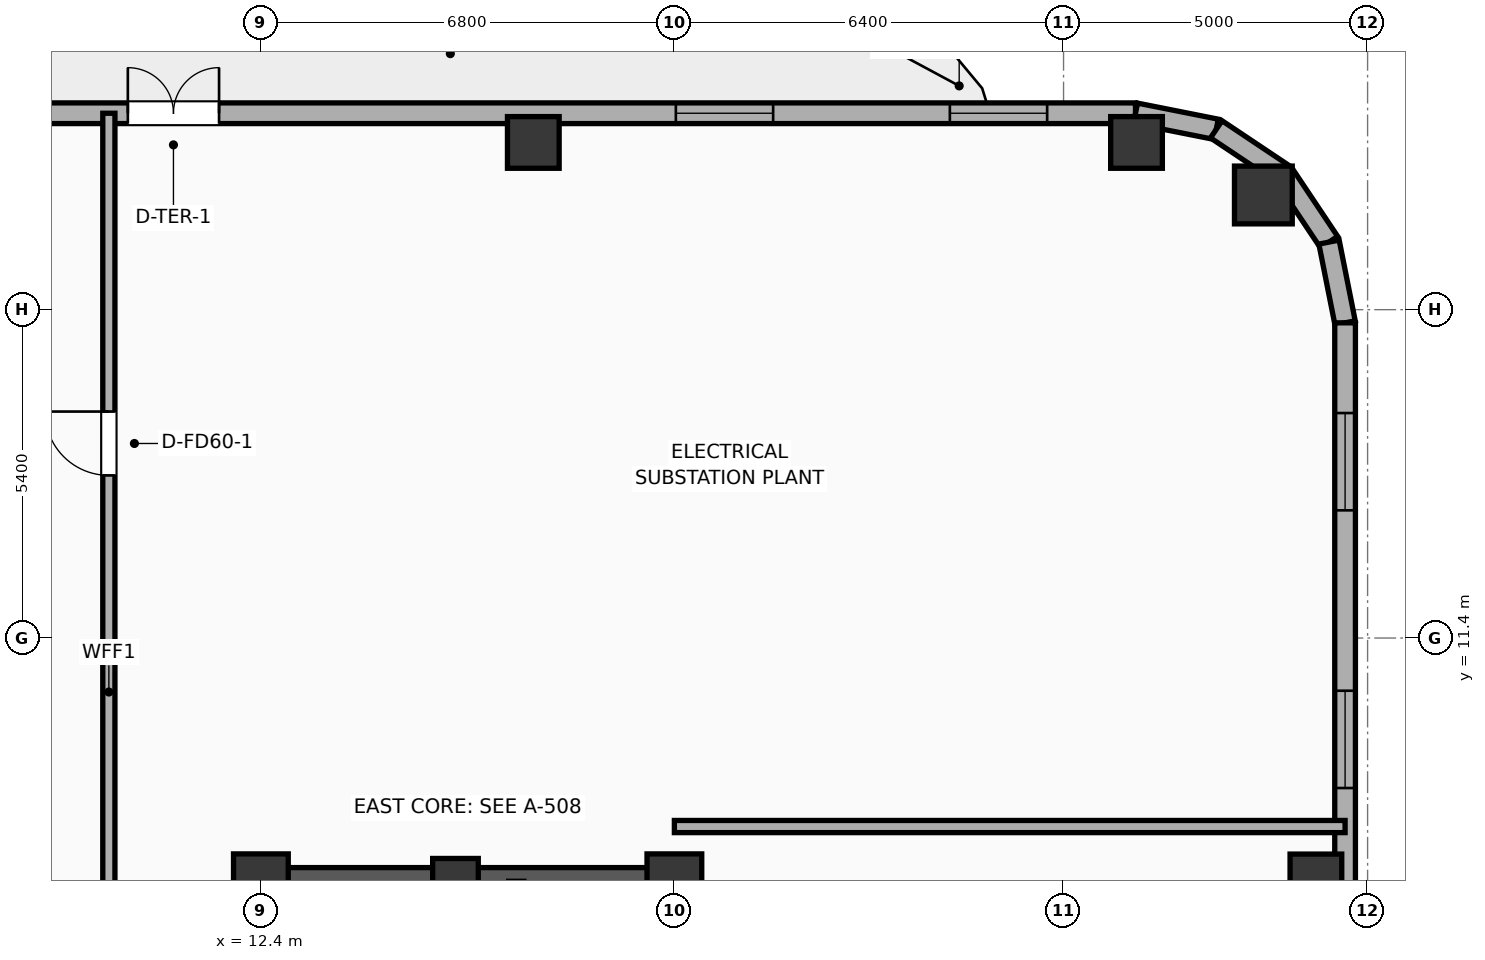
"""IFC4 building model, lengths in metres.
Left out: names, types, materials, properties, quantities, classifications, styles, units other than length and angle.
Written with IfcOpenShell. Run it as: python <this file> out.ifc"""

import sys

from ifc_helpers import new_model, si_unit, direction, frame, frame_2d, origin, origin_2d, place, context, subcontext, project, spatial, rectangle, hollow_rectangle, hollow_circle, extrude, element, fill, save


model = new_model("IFC4")
c1 = context("Model", 3, precision=1e-05, world=origin(), true_north=direction((0.0, 1.0)))
c2 = subcontext(c1, "Body", "Model", "MODEL_VIEW")
j1 = project(units=[si_unit("LENGTHUNIT", "METRE"), si_unit("PLANEANGLEUNIT", "RADIAN")], contexts=[c1])
p1 = place(None, origin())
s1 = spatial("IfcSite", under=j1, at=p1, CompositionType="ELEMENT")
p2 = place(p1, origin())
s2 = spatial("IfcBuilding", under=s1, at=p2, CompositionType="ELEMENT")
p3 = place(p2, frame((0.0, 0.0, 195.0)))
s3 = spatial("IfcBuildingStorey", under=s2, at=p3, CompositionType="ELEMENT", Elevation=195.0)
p4 = place(p3, frame((12.4, 7.4, 0.0), z_axis=(0.0, 0.0, 1.0), x_axis=(1.0, 0.0, 0.0)))
e1 = element("IfcColumn", 1, at=p4, inside=s3, PredefinedType="COLUMN", context=c2, shape_type="SweptSolid", body=[
    extrude(rectangle(XDim=0.9, YDim=0.9, at=origin_2d()), origin(), (0.0, 0.0, 1.0), 5.2),
])
p5 = place(p3, frame((15.6, 7.4, 0.0), z_axis=(0.0, 0.0, 1.0), x_axis=(1.0, 0.0, 0.0)))
e2 = element("IfcColumn", 2, at=p5, inside=s3, PredefinedType="COLUMN", context=c2, shape_type="SweptSolid", body=[
    extrude(rectangle(XDim=0.75, YDim=0.75, at=origin_2d()), origin(), (0.0, 0.0, 1.0), 5.2),
])
p6 = place(p3, frame((19.2, 7.4, 0.0), z_axis=(0.0, 0.0, 1.0), x_axis=(1.0, 0.0, 0.0)))
e3 = element("IfcColumn", 3, at=p6, inside=s3, PredefinedType="COLUMN", context=c2, shape_type="SweptSolid", body=[
    extrude(rectangle(XDim=0.9, YDim=0.9, at=origin_2d()), origin(), (0.0, 0.0, 1.0), 5.2),
])
p7 = place(p3, frame((12.175, 7.4, 0.0), z_axis=(0.0, 0.0, 1.0), x_axis=(1.0, 0.0, 0.0)))
e4 = element("IfcWall", 4, at=p7, inside=s3, PredefinedType="SHEAR", context=c2, shape_type="SweptSolid", body=[
    extrude(rectangle(XDim=7.25, YDim=0.45, at=frame_2d((3.625, 0.0))), origin(), (0.0, 0.0, 1.0), 4.8),
])
p8 = place(p3, frame((29.75, 7.422, -0.4), z_axis=(0.0, 0.0, 1.0), x_axis=(1.0, 0.0, 0.0)))
e5 = element("IfcColumn", 5, at=p8, inside=s3, PredefinedType="COLUMN", context=c2, shape_type="SweptSolid", body=[
    extrude(hollow_rectangle(XDim=0.85, YDim=0.85, WallThickness=0.028, at=origin_2d()), origin(), (0.0, 0.0, 1.0), 5.6),
])
p9 = place(p3, frame((28.886, 18.686, -0.4), z_axis=(0.0, 0.0, 1.0), x_axis=(1.0, 0.0, 0.0)))
e6 = element("IfcColumn", 6, at=p9, inside=s3, PredefinedType="COLUMN", context=c2, shape_type="SweptSolid", body=[
    extrude(hollow_circle(Radius=0.475, WallThickness=0.032, at=origin_2d()), origin(), (0.0, 0.0, 1.0), 5.6),
])
for number, where, z_axis, x_axis in (
    (7, (26.8, 19.55, -0.4), (0.0, 0.0, 1.0), (1.0, 0.0, 0.0)),
    (8, (16.88, 19.55, -0.4), (0.0, 0.0, 1.0), (1.0, 0.0, 0.0)),
):
    element("IfcColumn", number, at=place(p3, frame(where, z_axis=z_axis, x_axis=x_axis)), inside=s3, PredefinedType="COLUMN", context=c2, shape_type="SweptSolid", body=[
        extrude(hollow_rectangle(XDim=0.85, YDim=0.85, WallThickness=0.028, at=origin_2d()), origin(), (0.0, 0.0, 1.0), 5.6),
    ])
p10 = place(p3, frame((-22.783, 20.03, 0.0), z_axis=(0.0, 0.0, 1.0), x_axis=(1.0, 0.0, 0.0)))
e9 = element("IfcWall", 9, at=p10, inside=s3, PredefinedType="ELEMENTEDWALL", context=c2, shape_type="SweptSolid", body=[
    extrude(rectangle(XDim=49.566, YDim=0.34, at=frame_2d((24.783, 0.0))), origin(), (0.0, 0.0, 1.0), 3.69),
])
p11 = place(p10, frame((1.453, 0.0, 0.75)))
e10 = element("IfcOpeningElement", 10, at=p11, cuts=e9, PredefinedType="OPENING", context=c2, shape_type="SweptSolid", body=[
    extrude(rectangle(XDim=1.6, YDim=1.4, at=frame_2d((0.8, 0.7))), frame((0.0, 0.18, 0.0), z_axis=(0.0, -1.0, 0.0), x_axis=(1.0, 0.0, 0.0)), (0.0, 0.0, 1.0), 0.36),
])
p12 = place(p10, frame((5.959, 0.0, 0.75)))
e11 = element("IfcOpeningElement", 11, at=p12, cuts=e9, PredefinedType="OPENING", context=c2, shape_type="SweptSolid", body=[
    extrude(rectangle(XDim=1.6, YDim=1.4, at=frame_2d((0.8, 0.7))), frame((0.0, 0.18, 0.0), z_axis=(0.0, -1.0, 0.0), x_axis=(1.0, 0.0, 0.0)), (0.0, 0.0, 1.0), 0.36),
])
p13 = place(p10, frame((14.971, 0.0, 0.75)))
e12 = element("IfcOpeningElement", 12, at=p13, cuts=e9, PredefinedType="OPENING", context=c2, shape_type="SweptSolid", body=[
    extrude(rectangle(XDim=1.6, YDim=1.4, at=frame_2d((0.8, 0.7))), frame((0.0, 0.18, 0.0), z_axis=(0.0, -1.0, 0.0), x_axis=(1.0, 0.0, 0.0)), (0.0, 0.0, 1.0), 0.36),
])
p14 = place(p10, frame((23.983, 0.0, 0.75)))
e13 = element("IfcOpeningElement", 13, at=p14, cuts=e9, PredefinedType="OPENING", context=c2, shape_type="SweptSolid", body=[
    extrude(rectangle(XDim=1.6, YDim=1.4, at=frame_2d((0.8, 0.7))), frame((0.0, 0.18, 0.0), z_axis=(0.0, -1.0, 0.0), x_axis=(1.0, 0.0, 0.0)), (0.0, 0.0, 1.0), 0.36),
])
p15 = place(p10, frame((32.995, 0.0, 0.0)))
e14 = element("IfcOpeningElement", 14, at=p15, cuts=e9, PredefinedType="OPENING", context=c2, shape_type="SweptSolid", body=[
    extrude(rectangle(XDim=1.5, YDim=2.05, at=frame_2d((0.75, 1.025))), frame((0.0, 0.18, 0.0), z_axis=(0.0, -1.0, 0.0), x_axis=(1.0, 0.0, 0.0)), (0.0, 0.0, 1.0), 0.36),
])
p16 = place(p10, frame((42.008, 0.0, 0.75)))
e15 = element("IfcOpeningElement", 15, at=p16, cuts=e9, PredefinedType="OPENING", context=c2, shape_type="SweptSolid", body=[
    extrude(rectangle(XDim=1.6, YDim=1.4, at=frame_2d((0.8, 0.7))), frame((0.0, 0.18, 0.0), z_axis=(0.0, -1.0, 0.0), x_axis=(1.0, 0.0, 0.0)), (0.0, 0.0, 1.0), 0.36),
])
p17 = place(p10, frame((46.514, 0.0, 0.75)))
e16 = element("IfcOpeningElement", 16, at=p17, cuts=e9, PredefinedType="OPENING", context=c2, shape_type="SweptSolid", body=[
    extrude(rectangle(XDim=1.6, YDim=1.4, at=frame_2d((0.8, 0.7))), frame((0.0, 0.18, 0.0), z_axis=(0.0, -1.0, 0.0), x_axis=(1.0, 0.0, 0.0)), (0.0, 0.0, 1.0), 0.36),
])
p18 = place(p3, frame((26.783, 20.03, 0.0), z_axis=(0.0, 0.0, 1.0), x_axis=(0.980788153188, -0.195075878998, 0.0)))
e17 = element("IfcWall", 17, at=p18, inside=s3, PredefinedType="ELEMENTEDWALL", context=c2, shape_type="SweptSolid", body=[
    extrude(rectangle(XDim=1.354, YDim=0.34, at=frame_2d((0.677, 0.0))), origin(), (0.0, 0.0, 1.0), 3.69),
])
p19 = place(p3, frame((28.111, 19.766, 0.0), z_axis=(0.0, 0.0, 1.0), x_axis=(0.831403586725, -0.555669034571, 0.0)))
e18 = element("IfcWall", 18, at=p19, inside=s3, PredefinedType="ELEMENTEDWALL", context=c2, shape_type="SweptSolid", body=[
    extrude(rectangle(XDim=1.337, YDim=0.34, at=frame_2d((0.668, 0.0))), origin(), (0.0, 0.0, 1.0), 3.69),
])
p20 = place(p3, frame((29.223, 19.023, 0.0), z_axis=(0.0, 0.0, 1.0), x_axis=(0.555669034571, -0.831403586725, 0.0)))
e19 = element("IfcWall", 19, at=p20, inside=s3, PredefinedType="ELEMENTEDWALL", context=c2, shape_type="SweptSolid", body=[
    extrude(rectangle(XDim=1.337, YDim=0.34, at=frame_2d((0.668, 0.0))), origin(), (0.0, 0.0, 1.0), 4.8),
])
p21 = place(p3, frame((29.966, 17.911, 0.0), z_axis=(0.0, 0.0, 1.0), x_axis=(0.195075878998, -0.980788153188, 0.0)))
e20 = element("IfcWall", 20, at=p21, inside=s3, PredefinedType="ELEMENTEDWALL", context=c2, shape_type="SweptSolid", body=[
    extrude(rectangle(XDim=1.354, YDim=0.34, at=frame_2d((0.677, 0.0))), origin(), (0.0, 0.0, 1.0), 4.8),
])
p22 = place(p3, frame((30.23, 16.583, 0.0), z_axis=(0.0, 0.0, 1.0), x_axis=(0.0, -1.0, 0.0)))
e21 = element("IfcWall", 21, at=p22, inside=s3, PredefinedType="ELEMENTEDWALL", context=c2, shape_type="SweptSolid", body=[
    extrude(rectangle(XDim=31.967, YDim=0.34, at=frame_2d((15.983, 0.0))), origin(), (0.0, 0.0, 1.0), 3.69),
])
p23 = place(p22, frame((1.483, 0.0, 0.75)))
e22 = element("IfcOpeningElement", 22, at=p23, cuts=e21, PredefinedType="OPENING", context=c2, shape_type="SweptSolid", body=[
    extrude(rectangle(XDim=1.6, YDim=1.4, at=frame_2d((0.8, 0.7))), frame((0.0, 0.18, 0.0), z_axis=(0.0, -1.0, 0.0), x_axis=(1.0, 0.0, 0.0)), (0.0, 0.0, 1.0), 0.36),
])
p24 = place(p22, frame((6.05, 0.0, 0.75)))
e23 = element("IfcOpeningElement", 23, at=p24, cuts=e21, PredefinedType="OPENING", context=c2, shape_type="SweptSolid", body=[
    extrude(rectangle(XDim=1.6, YDim=1.4, at=frame_2d((0.8, 0.7))), frame((0.0, 0.18, 0.0), z_axis=(0.0, -1.0, 0.0), x_axis=(1.0, 0.0, 0.0)), (0.0, 0.0, 1.0), 0.36),
])
p25 = place(p22, frame((10.617, 0.0, 0.75)))
e24 = element("IfcOpeningElement", 24, at=p25, cuts=e21, PredefinedType="OPENING", context=c2, shape_type="SweptSolid", body=[
    extrude(rectangle(XDim=1.6, YDim=1.4, at=frame_2d((0.8, 0.7))), frame((0.0, 0.18, 0.0), z_axis=(0.0, -1.0, 0.0), x_axis=(1.0, 0.0, 0.0)), (0.0, 0.0, 1.0), 0.36),
])
p26 = place(p22, frame((19.75, 0.0, 0.75)))
e25 = element("IfcOpeningElement", 25, at=p26, cuts=e21, PredefinedType="OPENING", context=c2, shape_type="SweptSolid", body=[
    extrude(rectangle(XDim=1.6, YDim=1.4, at=frame_2d((0.8, 0.7))), frame((0.0, 0.18, 0.0), z_axis=(0.0, -1.0, 0.0), x_axis=(1.0, 0.0, 0.0)), (0.0, 0.0, 1.0), 0.36),
])
p27 = place(p22, frame((24.317, 0.0, 0.75)))
e26 = element("IfcOpeningElement", 26, at=p27, cuts=e21, PredefinedType="OPENING", context=c2, shape_type="SweptSolid", body=[
    extrude(rectangle(XDim=1.6, YDim=1.4, at=frame_2d((0.8, 0.7))), frame((0.0, 0.18, 0.0), z_axis=(0.0, -1.0, 0.0), x_axis=(1.0, 0.0, 0.0)), (0.0, 0.0, 1.0), 0.36),
])
p28 = place(p22, frame((28.883, 0.0, 0.75)))
e27 = element("IfcOpeningElement", 27, at=p28, cuts=e21, PredefinedType="OPENING", context=c2, shape_type="SweptSolid", body=[
    extrude(rectangle(XDim=1.6, YDim=1.4, at=frame_2d((0.8, 0.7))), frame((0.0, 0.18, 0.0), z_axis=(0.0, -1.0, 0.0), x_axis=(1.0, 0.0, 0.0)), (0.0, 0.0, 1.0), 0.36),
])
p29 = place(p3, frame((19.2, 8.3, 0.0), z_axis=(0.0, 0.0, 1.0), x_axis=(1.0, 0.0, 0.0)))
e28 = element("IfcWall", 28, at=p29, inside=s3, PredefinedType="PARTITIONING", context=c2, shape_type="SweptSolid", body=[
    extrude(rectangle(XDim=11.03, YDim=0.2, at=frame_2d((5.515, 0.0))), origin(), (0.0, 0.0, 1.0), 4.8),
])
p30 = place(p3, frame((9.9, 7.1, 0.0), z_axis=(0.0, 0.0, 1.0), x_axis=(0.0, 1.0, 0.0)))
e29 = element("IfcWall", 29, at=p30, inside=s3, PredefinedType="PARTITIONING", context=c2, shape_type="SweptSolid", body=[
    extrude(rectangle(XDim=12.93, YDim=0.2, at=frame_2d((6.465, 0.0))), origin(), (0.0, 0.0, 1.0), 4.8),
])
p31 = place(p30, frame((6.974, 0.0, 0.0)))
e30 = element("IfcOpeningElement", 30, at=p31, cuts=e29, PredefinedType="OPENING", context=c2, shape_type="SweptSolid", body=[
    extrude(rectangle(XDim=1.05, YDim=2.05, at=frame_2d((0.525, 1.025))), frame((0.0, 0.11, 0.0), z_axis=(0.0, -1.0, 0.0), x_axis=(1.0, 0.0, 0.0)), (0.0, 0.0, 1.0), 0.22),
])
p32 = place(p15, origin())
e31 = element("IfcDoor", 31, at=p32, inside=s3, OperationType="DOUBLE_DOOR_SINGLE_SWING", PredefinedType="DOOR", context=c2, shape_type="SweptSolid", body=[
    extrude(rectangle(XDim=1.5, YDim=2.05, at=frame_2d((0.75, 1.025))), frame((0.0, 0.025, 0.0), z_axis=(0.0, -1.0, 0.0), x_axis=(1.0, 0.0, 0.0)), (0.0, 0.0, 1.0), 0.05),
])
fill(e14, e31)
p33 = place(p16, origin())
e32 = element("IfcWindow", 32, at=p33, inside=s3, PartitioningType="SINGLE_PANEL", PredefinedType="WINDOW", context=c2, shape_type="SweptSolid", body=[
    extrude(rectangle(XDim=1.6, YDim=1.4, at=frame_2d((0.8, 0.7))), frame((0.0, 0.03, 0.0), z_axis=(0.0, -1.0, 0.0), x_axis=(1.0, 0.0, 0.0)), (0.0, 0.0, 1.0), 0.06),
])
fill(e15, e32)
p34 = place(p17, origin())
e33 = element("IfcWindow", 33, at=p34, inside=s3, PartitioningType="SINGLE_PANEL", PredefinedType="WINDOW", context=c2, shape_type="SweptSolid", body=[
    extrude(rectangle(XDim=1.6, YDim=1.4, at=frame_2d((0.8, 0.7))), frame((0.0, 0.03, 0.0), z_axis=(0.0, -1.0, 0.0), x_axis=(1.0, 0.0, 0.0)), (0.0, 0.0, 1.0), 0.06),
])
fill(e16, e33)
p35 = place(p23, origin())
e34 = element("IfcWindow", 34, at=p35, inside=s3, PartitioningType="SINGLE_PANEL", PredefinedType="WINDOW", context=c2, shape_type="SweptSolid", body=[
    extrude(rectangle(XDim=1.6, YDim=1.4, at=frame_2d((0.8, 0.7))), frame((0.0, 0.03, 0.0), z_axis=(0.0, -1.0, 0.0), x_axis=(1.0, 0.0, 0.0)), (0.0, 0.0, 1.0), 0.06),
])
fill(e22, e34)
p36 = place(p24, origin())
e35 = element("IfcWindow", 35, at=p36, inside=s3, PartitioningType="SINGLE_PANEL", PredefinedType="WINDOW", context=c2, shape_type="SweptSolid", body=[
    extrude(rectangle(XDim=1.6, YDim=1.4, at=frame_2d((0.8, 0.7))), frame((0.0, 0.03, 0.0), z_axis=(0.0, -1.0, 0.0), x_axis=(1.0, 0.0, 0.0)), (0.0, 0.0, 1.0), 0.06),
])
fill(e23, e35)
p37 = place(p31, origin())
e36 = element("IfcDoor", 36, at=p37, inside=s3, OperationType="SINGLE_SWING_RIGHT", PredefinedType="DOOR", context=c2, shape_type="SweptSolid", body=[
    extrude(rectangle(XDim=1.05, YDim=2.05, at=frame_2d((0.525, 1.025))), frame((0.0, 0.025, 0.0), z_axis=(0.0, -1.0, 0.0), x_axis=(1.0, 0.0, 0.0)), (0.0, 0.0, 1.0), 0.05),
])
fill(e30, e36)
save(model, sys.argv[1])
